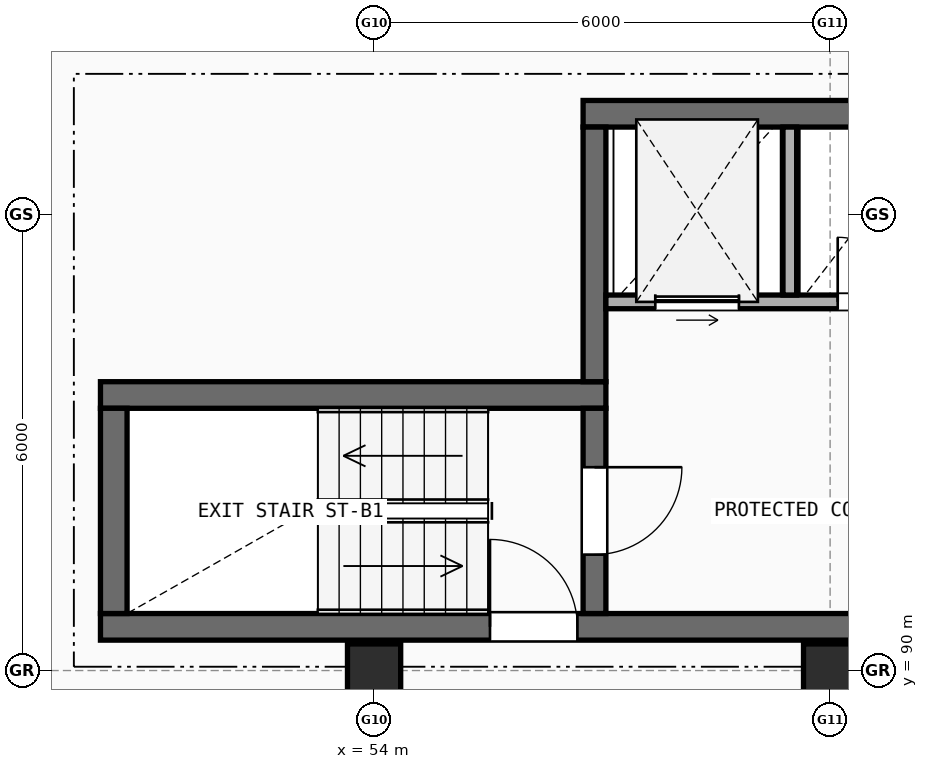
"""IFC4 building model, lengths in metres.
Left out: names, types, materials, properties, quantities, classifications, styles, units other than length and angle.
Written with IfcOpenShell. Run it as: python <this file> out.ifc"""

import sys

from ifc_helpers import new_model, si_unit, direction, frame, frame_2d, origin, origin_2d, place, context, subcontext, project, spatial, rectangle, extrude, element, fill, save


model = new_model("IFC4")
c1 = context("Model", 3, precision=1e-05, world=origin(), true_north=direction((0.0, 1.0)))
c2 = subcontext(c1, "Body", "Model", "MODEL_VIEW")
j1 = project(units=[si_unit("LENGTHUNIT", "METRE"), si_unit("PLANEANGLEUNIT", "RADIAN")], contexts=[c1])
p1 = place(None, origin())
s1 = spatial("IfcSite", under=j1, at=p1, CompositionType="ELEMENT")
p2 = place(p1, origin())
s2 = spatial("IfcBuilding", under=s1, at=p2, CompositionType="ELEMENT")
p3 = place(p2, frame((0.0, 0.0, 4.5)))
s3 = spatial("IfcBuildingStorey", under=s2, at=p3, CompositionType="ELEMENT", Elevation=4.5)
for number, where, z_axis, x_axis in (
    (1, (54.0, 90.0, 0.0), (0.0, 0.0, 1.0), (1.0, 0.0, 0.0)),
    (2, (60.0, 90.0, 0.0), (0.0, 0.0, 1.0), (1.0, 0.0, 0.0)),
):
    element("IfcColumn", number, at=place(p3, frame(where, z_axis=z_axis, x_axis=x_axis)), inside=s3, PredefinedType="COLUMN", context=c2, shape_type="SweptSolid", body=[
        extrude(rectangle(XDim=0.7, YDim=0.7, at=origin_2d()), origin(), (0.0, 0.0, 1.0), 2.945),
    ])
p4 = place(p3, frame((50.4, 90.575, 0.0), z_axis=(0.0, 0.0, 1.0), x_axis=(1.0, 0.0, 0.0)))
e3 = element("IfcWall", 3, at=p4, inside=s3, PredefinedType="SHEAR", context=c2, shape_type="SweptSolid", body=[
    extrude(rectangle(XDim=11.4, YDim=0.35, at=frame_2d((5.7, 0.0))), origin(), (0.0, 0.0, 1.0), 2.945),
])
p5 = place(p4, frame((5.125, 0.0, 0.0)))
e4 = element("IfcOpeningElement", 4, at=p5, cuts=e3, PredefinedType="OPENING", context=c2, shape_type="SweptSolid", body=[
    extrude(rectangle(XDim=1.15, YDim=2.15, at=frame_2d((0.575, 1.075))), frame((0.0, 0.185, 0.0), z_axis=(0.0, -1.0, 0.0), x_axis=(1.0, 0.0, 0.0)), (0.0, 0.0, 1.0), 0.37),
])
p6 = place(p3, frame((57.05, 93.625, 0.0), z_axis=(0.0, 0.0, 1.0), x_axis=(-1.0, 0.0, 0.0)))
e5 = element("IfcWall", 5, at=p6, inside=s3, PredefinedType="SHEAR", context=c2, shape_type="SweptSolid", body=[
    extrude(rectangle(XDim=6.65, YDim=0.35, at=frame_2d((3.325, 0.0))), origin(), (0.0, 0.0, 1.0), 2.945),
])
p7 = place(p3, frame((50.575, 93.45, 0.0), z_axis=(0.0, 0.0, 1.0), x_axis=(0.0, -1.0, 0.0)))
e6 = element("IfcWall", 6, at=p7, inside=s3, PredefinedType="SHEAR", context=c2, shape_type="SweptSolid", body=[
    extrude(rectangle(XDim=2.7, YDim=0.35, at=frame_2d((1.35, 0.0))), origin(), (0.0, 0.0, 1.0), 2.945),
])
p8 = place(p3, frame((56.9, 90.75, 0.0), z_axis=(0.0, 0.0, 1.0), x_axis=(0.0, 1.0, 0.0)))
e7 = element("IfcWall", 7, at=p8, inside=s3, PredefinedType="SHEAR", context=c2, shape_type="SweptSolid", body=[
    extrude(rectangle(XDim=2.7, YDim=0.3, at=frame_2d((1.35, 0.0))), origin(), (0.0, 0.0, 1.0), 2.945),
])
p9 = place(p8, frame((0.775, 0.0, 0.0)))
e8 = element("IfcOpeningElement", 8, at=p9, cuts=e7, PredefinedType="OPENING", context=c2, shape_type="SweptSolid", body=[
    extrude(rectangle(XDim=1.15, YDim=2.15, at=frame_2d((0.575, 1.075))), frame((0.0, 0.16, 0.0), z_axis=(0.0, -1.0, 0.0), x_axis=(1.0, 0.0, 0.0)), (0.0, 0.0, 1.0), 0.32),
])
p10 = place(p3, frame((61.8, 97.325, 0.0), z_axis=(0.0, 0.0, 1.0), x_axis=(-1.0, 0.0, 0.0)))
e9 = element("IfcWall", 9, at=p10, inside=s3, PredefinedType="SHEAR", context=c2, shape_type="SweptSolid", body=[
    extrude(rectangle(XDim=5.05, YDim=0.35, at=frame_2d((2.525, 0.0))), origin(), (0.0, 0.0, 1.0), 2.945),
])
p11 = place(p3, frame((56.9, 93.8, 0.0), z_axis=(0.0, 0.0, 1.0), x_axis=(0.0, 1.0, 0.0)))
e10 = element("IfcWall", 10, at=p11, inside=s3, PredefinedType="SHEAR", context=c2, shape_type="SweptSolid", body=[
    extrude(rectangle(XDim=3.35, YDim=0.3, at=frame_2d((1.675, 0.0))), origin(), (0.0, 0.0, 1.0), 2.945),
])
p12 = place(p3, frame((57.05, 94.85, 0.0), z_axis=(0.0, 0.0, 1.0), x_axis=(1.0, 0.0, 0.0)))
e11 = element("IfcWall", 11, at=p12, inside=s3, PredefinedType="SOLIDWALL", context=c2, shape_type="SweptSolid", body=[
    extrude(rectangle(XDim=4.4, YDim=0.18, at=frame_2d((2.2, 0.0))), origin(), (0.0, 0.0, 1.0), 2.945),
])
p13 = place(p12, frame((0.65, 0.0, 0.0)))
e12 = element("IfcOpeningElement", 12, at=p13, cuts=e11, PredefinedType="OPENING", context=c2, shape_type="SweptSolid", body=[
    extrude(rectangle(XDim=1.1, YDim=2.15, at=frame_2d((0.55, 1.075))), frame((0.0, 0.1, 0.0), z_axis=(0.0, -1.0, 0.0), x_axis=(1.0, 0.0, 0.0)), (0.0, 0.0, 1.0), 0.2),
])
p14 = place(p12, frame((3.05, 0.0, 0.0)))
e13 = element("IfcOpeningElement", 13, at=p14, cuts=e11, PredefinedType="OPENING", context=c2, shape_type="SweptSolid", body=[
    extrude(rectangle(XDim=0.85, YDim=2.1, at=frame_2d((0.425, 1.05))), frame((0.0, 0.1, 0.0), z_axis=(0.0, -1.0, 0.0), x_axis=(1.0, 0.0, 0.0)), (0.0, 0.0, 1.0), 0.2),
])
p15 = place(p3, frame((59.47, 94.94, 0.0), z_axis=(0.0, 0.0, 1.0), x_axis=(0.0, 1.0, 0.0)))
e14 = element("IfcWall", 14, at=p15, inside=s3, PredefinedType="SOLIDWALL", context=c2, shape_type="SweptSolid", body=[
    extrude(rectangle(XDim=2.21, YDim=0.18, at=frame_2d((1.105, 0.0))), origin(), (0.0, 0.0, 1.0), 2.945),
])
p16 = place(p5, origin())
e15 = element("IfcDoor", 15, at=p16, inside=s3, OperationType="SINGLE_SWING_LEFT", PredefinedType="DOOR", context=c2, shape_type="SweptSolid", body=[
    extrude(rectangle(XDim=1.15, YDim=2.15, at=frame_2d((0.575, 1.075))), frame((0.0, 0.025, 0.0), z_axis=(0.0, -1.0, 0.0), x_axis=(1.0, 0.0, 0.0)), (0.0, 0.0, 1.0), 0.05),
])
fill(e4, e15)
p17 = place(p9, origin())
e16 = element("IfcDoor", 16, at=p17, inside=s3, OperationType="SINGLE_SWING_RIGHT", PredefinedType="DOOR", context=c2, shape_type="SweptSolid", body=[
    extrude(rectangle(XDim=1.15, YDim=2.15, at=frame_2d((0.575, 1.075))), frame((0.0, 0.025, 0.0), z_axis=(0.0, -1.0, 0.0), x_axis=(1.0, 0.0, 0.0)), (0.0, 0.0, 1.0), 0.05),
])
fill(e8, e16)
p18 = place(p13, origin())
e17 = element("IfcDoor", 17, at=p18, inside=s3, OperationType="SLIDING_TO_LEFT", PredefinedType="DOOR", context=c2, shape_type="SweptSolid", body=[
    extrude(rectangle(XDim=1.1, YDim=2.15, at=frame_2d((0.55, 1.075))), frame((0.0, 0.025, 0.0), z_axis=(0.0, -1.0, 0.0), x_axis=(1.0, 0.0, 0.0)), (0.0, 0.0, 1.0), 0.05),
])
fill(e12, e17)
p19 = place(p14, frame((0.85, 0.0, 0.0), z_axis=(0.0, 0.0, 1.0), x_axis=(-1.0, 0.0, 0.0)))
e18 = element("IfcDoor", 18, at=p19, inside=s3, OperationType="SINGLE_SWING_LEFT", PredefinedType="DOOR", context=c2, shape_type="SweptSolid", body=[
    extrude(rectangle(XDim=0.85, YDim=2.1, at=frame_2d((0.425, 1.05))), frame((0.0, 0.025, 0.0), z_axis=(0.0, -1.0, 0.0), x_axis=(1.0, 0.0, 0.0)), (0.0, 0.0, 1.0), 0.05),
])
fill(e13, e18)
save(model, sys.argv[1])
